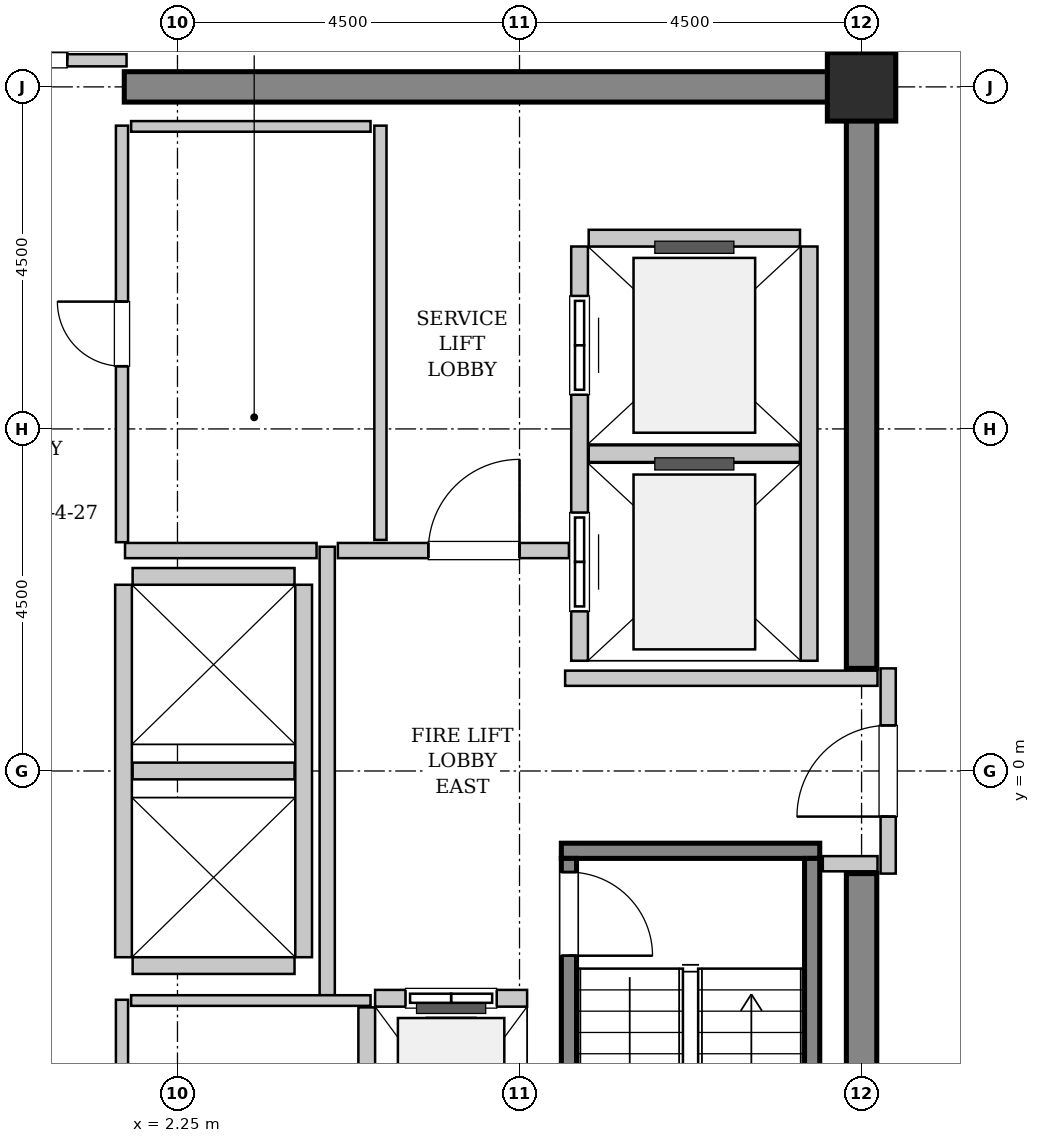
"""IFC4 building model, lengths in metres.
Left out: names, types, materials, properties, quantities, classifications, styles, units other than length and angle.
Written with IfcOpenShell. Run it as: python <this file> out.ifc"""

import sys

from ifc_helpers import new_model, si_unit, direction, frame, frame_2d, origin, origin_2d, place, context, subcontext, project, spatial, rectangle, extrude, source, transform, mapped, element, fill, save


model = new_model("IFC4")
c1 = context("Model", 3, precision=1e-05, world=origin(), true_north=direction((0.0, 1.0)))
c2 = subcontext(c1, "Body", "Model", "MODEL_VIEW")
j1 = project(units=[si_unit("LENGTHUNIT", "METRE"), si_unit("PLANEANGLEUNIT", "RADIAN")], contexts=[c1])
p1 = place(None, origin())
s1 = spatial("IfcSite", under=j1, at=p1, CompositionType="ELEMENT")
p2 = place(p1, origin())
s2 = spatial("IfcBuilding", under=s1, at=p2, CompositionType="ELEMENT")
p3 = place(p2, frame((0.0, 0.0, 322.4)))
s3 = spatial("IfcBuildingStorey", under=s2, at=p3, CompositionType="ELEMENT", Elevation=322.4)
m1 = source(origin(), c2, "Body", "SweptSolid", [
    extrude(rectangle(XDim=9.9, YDim=0.4, at=frame_2d((4.95, 0.0))), origin(), (0.0, 0.0, 1.0), 3.8),
])
p4 = place(p3, frame((1.55, 9.0, 0.0), z_axis=(0.0, 0.0, 1.0), x_axis=(1.0, 0.0, 0.0)))
e1 = element("IfcWall", 1, at=p4, inside=s3, PredefinedType="SHEAR", context=c2, shape_type="MappedRepresentation", body=[
    mapped(m1, transform((0.0, 0.0, 0.0), x_axis=(1.0, 0.0, 0.0), y_axis=(0.0, 1.0, 0.0), z_axis=(0.0, 0.0, 1.0), scale=1.0)),
])
m2 = source(origin(), c2, "Body", "SweptSolid", [
    extrude(rectangle(XDim=7.45, YDim=0.4, at=frame_2d((3.725, 0.0))), origin(), (0.0, 0.0, 1.0), 3.8),
])
for number, where, z_axis, x_axis in (
    (2, (11.25, -8.8, 0.0), (0.0, 0.0, 1.0), (0.0, 1.0, 0.0)),
    (3, (11.25, 1.35, 0.0), (0.0, 0.0, 1.0), (0.0, 1.0, 0.0)),
):
    element("IfcWall", number, at=place(p3, frame(where, z_axis=z_axis, x_axis=x_axis)), inside=s3, PredefinedType="SHEAR", context=c2, shape_type="MappedRepresentation", body=[
        mapped(m2, transform((0.0, 0.0, 0.0), x_axis=(1.0, 0.0, 0.0), y_axis=(0.0, 1.0, 0.0), z_axis=(0.0, 0.0, 1.0), scale=1.0)),
    ])
m3 = source(origin(), c2, "Body", "SweptSolid", [
    extrude(rectangle(XDim=0.9, YDim=0.9, at=origin_2d()), origin(), (0.0, 0.0, 1.0), 3.8),
])
p5 = place(p3, frame((11.25, 9.0, 0.0), z_axis=(0.0, 0.0, 1.0), x_axis=(1.0, 0.0, 0.0)))
e4 = element("IfcColumn", 4, at=p5, inside=s3, PredefinedType="COLUMN", context=c2, shape_type="MappedRepresentation", body=[
    mapped(m3, transform((0.0, 0.0, 0.0), x_axis=(1.0, 0.0, 0.0), y_axis=(0.0, 1.0, 0.0), z_axis=(0.0, 0.0, 1.0), scale=1.0)),
])
m4 = source(origin(), c2, "Body", "SweptSolid", [
    extrude(rectangle(XDim=3.4, YDim=0.2, at=frame_2d((1.7, 0.0))), origin(), (0.0, 0.0, 1.0), 3.8),
])
p6 = place(p3, frame((7.3, -1.05, 0.0), z_axis=(0.0, 0.0, 1.0), x_axis=(1.0, 0.0, 0.0)))
e5 = element("IfcWall", 5, at=p6, inside=s3, PredefinedType="SOLIDWALL", context=c2, shape_type="MappedRepresentation", body=[
    mapped(m4, transform((0.0, 0.0, 0.0), x_axis=(1.0, 0.0, 0.0), y_axis=(0.0, 1.0, 0.0), z_axis=(0.0, 0.0, 1.0), scale=1.0)),
])
m5 = source(origin(), c2, "Body", "SweptSolid", [
    extrude(rectangle(XDim=7.1, YDim=0.2, at=frame_2d((3.55, 0.0))), origin(), (0.0, 0.0, 1.0), 3.8),
])
p7 = place(p3, frame((7.4, -1.15, 0.0), z_axis=(0.0, 0.0, 1.0), x_axis=(0.0, -1.0, 0.0)))
e6 = element("IfcWall", 6, at=p7, inside=s3, PredefinedType="SOLIDWALL", context=c2, shape_type="MappedRepresentation", body=[
    mapped(m5, transform((0.0, 0.0, 0.0), x_axis=(1.0, 0.0, 0.0), y_axis=(0.0, 1.0, 0.0), z_axis=(0.0, 0.0, 1.0), scale=1.0)),
])
p8 = place(p7, frame((0.18, 0.0, 0.0)))
e7 = element("IfcOpeningElement", 7, at=p8, cuts=e6, PredefinedType="OPENING", context=c2, shape_type="SweptSolid", body=[
    extrude(rectangle(XDim=1.1, YDim=2.15, at=frame_2d((0.55, 1.075))), frame((0.0, 0.11, 0.0), z_axis=(0.0, -1.0, 0.0), x_axis=(1.0, 0.0, 0.0)), (0.0, 0.0, 1.0), 0.22),
])
p9 = place(p3, frame((10.6, -1.15, 0.0), z_axis=(0.0, 0.0, 1.0), x_axis=(0.0, -1.0, 0.0)))
e8 = element("IfcWall", 8, at=p9, inside=s3, PredefinedType="SOLIDWALL", context=c2, shape_type="MappedRepresentation", body=[
    mapped(m5, transform((0.0, 0.0, 0.0), x_axis=(1.0, 0.0, 0.0), y_axis=(0.0, 1.0, 0.0), z_axis=(0.0, 0.0, 1.0), scale=1.0)),
])
m6 = source(origin(), c2, "Body", "SweptSolid", [
    extrude(rectangle(XDim=2.0, YDim=0.22, at=frame_2d((1.0, 0.0))), origin(), (0.0, 0.0, 1.0), 3.535),
])
p10 = place(p3, frame((6.85, -2.99, 0.0), z_axis=(0.0, 0.0, 1.0), x_axis=(-1.0, 0.0, 0.0)))
e9 = element("IfcWall", 9, at=p10, inside=s3, PredefinedType="SOLIDWALL", context=c2, shape_type="MappedRepresentation", body=[
    mapped(m6, transform((0.0, 0.0, 0.0), x_axis=(1.0, 0.0, 0.0), y_axis=(0.0, 1.0, 0.0), z_axis=(0.0, 0.0, 1.0), scale=1.0)),
])
p11 = place(p10, frame((0.4, 0.0, 0.0)))
e10 = element("IfcOpeningElement", 10, at=p11, cuts=e9, PredefinedType="OPENING", context=c2, shape_type="SweptSolid", body=[
    extrude(rectangle(XDim=1.2, YDim=2.2, at=frame_2d((0.6, 1.1))), frame((0.0, 0.12, 0.0), z_axis=(0.0, -1.0, 0.0), x_axis=(1.0, 0.0, 0.0)), (0.0, 0.0, 1.0), 0.24),
])
m7 = source(origin(), c2, "Body", "SweptSolid", [
    extrude(rectangle(XDim=2.68, YDim=0.22, at=frame_2d((1.34, 0.0))), origin(), (0.0, 0.0, 1.0), 3.535),
])
p12 = place(p3, frame((4.74, -3.11, 0.0), z_axis=(0.0, 0.0, 1.0), x_axis=(0.0, -1.0, 0.0)))
e11 = element("IfcWall", 11, at=p12, inside=s3, PredefinedType="SOLIDWALL", context=c2, shape_type="MappedRepresentation", body=[
    mapped(m7, transform((0.0, 0.0, 0.0), x_axis=(1.0, 0.0, 0.0), y_axis=(0.0, 1.0, 0.0), z_axis=(0.0, 0.0, 1.0), scale=1.0)),
])
m8 = source(origin(), c2, "Body", "SweptSolid", [
    extrude(rectangle(XDim=5.45, YDim=0.22, at=frame_2d((2.725, 0.0))), origin(), (0.0, 0.0, 1.0), 3.535),
])
p13 = place(p3, frame((7.54, 6.9, 0.0), z_axis=(0.0, 0.0, 1.0), x_axis=(0.0, -1.0, 0.0)))
e12 = element("IfcWall", 12, at=p13, inside=s3, PredefinedType="SOLIDWALL", context=c2, shape_type="MappedRepresentation", body=[
    mapped(m8, transform((0.0, 0.0, 0.0), x_axis=(1.0, 0.0, 0.0), y_axis=(0.0, 1.0, 0.0), z_axis=(0.0, 0.0, 1.0), scale=1.0)),
])
p14 = place(p13, frame((3.5, 0.0, 0.0)))
e13 = element("IfcOpeningElement", 13, at=p14, cuts=e12, PredefinedType="OPENING", context=c2, shape_type="SweptSolid", body=[
    extrude(rectangle(XDim=1.3, YDim=2.3, at=frame_2d((0.65, 1.15))), frame((0.0, 0.12, 0.0), z_axis=(0.0, -1.0, 0.0), x_axis=(1.0, 0.0, 0.0)), (0.0, 0.0, 1.0), 0.24),
])
p15 = place(p13, frame((0.65, 0.0, 0.0)))
e14 = element("IfcOpeningElement", 14, at=p15, cuts=e12, PredefinedType="OPENING", context=c2, shape_type="SweptSolid", body=[
    extrude(rectangle(XDim=1.3, YDim=2.3, at=frame_2d((0.65, 1.15))), frame((0.0, 0.12, 0.0), z_axis=(0.0, -1.0, 0.0), x_axis=(1.0, 0.0, 0.0)), (0.0, 0.0, 1.0), 0.24),
])
p16 = place(p3, frame((10.56, 1.45, 0.0), z_axis=(0.0, 0.0, 1.0), x_axis=(0.0, 1.0, 0.0)))
e15 = element("IfcWall", 15, at=p16, inside=s3, PredefinedType="SOLIDWALL", context=c2, shape_type="MappedRepresentation", body=[
    mapped(m8, transform((0.0, 0.0, 0.0), x_axis=(1.0, 0.0, 0.0), y_axis=(0.0, 1.0, 0.0), z_axis=(0.0, 0.0, 1.0), scale=1.0)),
])
m9 = source(origin(), c2, "Body", "SweptSolid", [
    extrude(rectangle(XDim=2.78, YDim=0.22, at=frame_2d((1.39, 0.0))), origin(), (0.0, 0.0, 1.0), 3.535),
])
for number, where, z_axis, x_axis in (
    (16, (7.66, 4.175, 0.0), (0.0, 0.0, 1.0), (1.0, 0.0, 0.0)),
    (17, (10.44, 7.01, 0.0), (0.0, 0.0, 1.0), (-1.0, 0.0, 0.0)),
):
    element("IfcWall", number, at=place(p3, frame(where, z_axis=z_axis, x_axis=x_axis)), inside=s3, PredefinedType="SOLIDWALL", context=c2, shape_type="MappedRepresentation", body=[
        mapped(m9, transform((0.0, 0.0, 0.0), x_axis=(1.0, 0.0, 0.0), y_axis=(0.0, 1.0, 0.0), z_axis=(0.0, 0.0, 1.0), scale=1.0)),
    ])
m10 = source(origin(), c2, "Body", "SweptSolid", [
    extrude(rectangle(XDim=4.9, YDim=0.22, at=frame_2d((2.45, 0.0))), origin(), (0.0, 0.0, 1.0), 3.535),
])
for number, where, z_axis, x_axis in (
    (18, (1.54, 2.45, 0.0), (0.0, 0.0, 1.0), (0.0, -1.0, 0.0)),
    (19, (3.91, -2.45, 0.0), (0.0, 0.0, 1.0), (0.0, 1.0, 0.0)),
):
    element("IfcWall", number, at=place(p3, frame(where, z_axis=z_axis, x_axis=x_axis)), inside=s3, PredefinedType="SOLIDWALL", context=c2, shape_type="MappedRepresentation", body=[
        mapped(m10, transform((0.0, 0.0, 0.0), x_axis=(1.0, 0.0, 0.0), y_axis=(0.0, 1.0, 0.0), z_axis=(0.0, 0.0, 1.0), scale=1.0)),
    ])
m11 = source(origin(), c2, "Body", "SweptSolid", [
    extrude(rectangle(XDim=2.13, YDim=0.22, at=frame_2d((1.065, 0.0))), origin(), (0.0, 0.0, 1.0), 3.535),
])
for number, where, z_axis, x_axis in (
    (20, (1.66, -2.56, 0.0), (0.0, 0.0, 1.0), (1.0, 0.0, 0.0)),
    (21, (1.66, 0.0, 0.0), (0.0, 0.0, 1.0), (1.0, 0.0, 0.0)),
    (22, (3.79, 2.56, 0.0), (0.0, 0.0, 1.0), (-1.0, 0.0, 0.0)),
):
    element("IfcWall", number, at=place(p3, frame(where, z_axis=z_axis, x_axis=x_axis)), inside=s3, PredefinedType="SOLIDWALL", context=c2, shape_type="MappedRepresentation", body=[
        mapped(m11, transform((0.0, 0.0, 0.0), x_axis=(1.0, 0.0, 0.0), y_axis=(0.0, 1.0, 0.0), z_axis=(0.0, 0.0, 1.0), scale=1.0)),
    ])
m12 = source(origin(), c2, "Body", "SweptSolid", [
    extrude(rectangle(XDim=2.7, YDim=0.2, at=frame_2d((1.35, 0.0))), origin(), (0.0, 0.0, 1.0), 2.625),
])
p17 = place(p3, frame((11.6, -1.35, 0.0), z_axis=(0.0, 0.0, 1.0), x_axis=(0.0, 1.0, 0.0)))
e23 = element("IfcWall", 23, at=p17, inside=s3, PredefinedType="PARTITIONING", context=c2, shape_type="MappedRepresentation", body=[
    mapped(m12, transform((0.0, 0.0, 0.0), x_axis=(1.0, 0.0, 0.0), y_axis=(0.0, 1.0, 0.0), z_axis=(0.0, 0.0, 1.0), scale=1.0)),
])
p18 = place(p17, frame((0.75, 0.0, 0.0)))
e24 = element("IfcOpeningElement", 24, at=p18, cuts=e23, PredefinedType="OPENING", context=c2, shape_type="SweptSolid", body=[
    extrude(rectangle(XDim=1.2, YDim=2.15, at=frame_2d((0.6, 1.075))), frame((0.0, 0.11, 0.0), z_axis=(0.0, -1.0, 0.0), x_axis=(1.0, 0.0, 0.0)), (0.0, 0.0, 1.0), 0.22),
])
m13 = source(origin(), c2, "Body", "SweptSolid", [
    extrude(rectangle(XDim=5.9, YDim=0.2, at=frame_2d((2.95, 0.0))), origin(), (0.0, 0.0, 1.0), 3.535),
])
p19 = place(p3, frame((4.22, -2.95, 0.0), z_axis=(0.0, 0.0, 1.0), x_axis=(0.0, 1.0, 0.0)))
e25 = element("IfcWall", 25, at=p19, inside=s3, PredefinedType="PARTITIONING", context=c2, shape_type="MappedRepresentation", body=[
    mapped(m13, transform((0.0, 0.0, 0.0), x_axis=(1.0, 0.0, 0.0), y_axis=(0.0, 1.0, 0.0), z_axis=(0.0, 0.0, 1.0), scale=1.0)),
])
m14 = source(origin(), c2, "Body", "SweptSolid", [
    extrude(rectangle(XDim=2.52, YDim=0.2, at=frame_2d((1.26, 0.0))), origin(), (0.0, 0.0, 1.0), 3.535),
])
p20 = place(p3, frame((1.56, 2.9, 0.0), z_axis=(0.0, 0.0, 1.0), x_axis=(1.0, 0.0, 0.0)))
e26 = element("IfcWall", 26, at=p20, inside=s3, PredefinedType="PARTITIONING", context=c2, shape_type="MappedRepresentation", body=[
    mapped(m14, transform((0.0, 0.0, 0.0), x_axis=(1.0, 0.0, 0.0), y_axis=(0.0, 1.0, 0.0), z_axis=(0.0, 0.0, 1.0), scale=1.0)),
])
m15 = source(origin(), c2, "Body", "SweptSolid", [
    extrude(rectangle(XDim=3.04, YDim=0.2, at=frame_2d((1.52, 0.0))), origin(), (0.0, 0.0, 1.0), 3.535),
])
p21 = place(p3, frame((4.36, 2.9, 0.0), z_axis=(0.0, 0.0, 1.0), x_axis=(1.0, 0.0, 0.0)))
e27 = element("IfcWall", 27, at=p21, inside=s3, PredefinedType="PARTITIONING", context=c2, shape_type="MappedRepresentation", body=[
    mapped(m15, transform((0.0, 0.0, 0.0), x_axis=(1.0, 0.0, 0.0), y_axis=(0.0, 1.0, 0.0), z_axis=(0.0, 0.0, 1.0), scale=1.0)),
])
p22 = place(p21, frame((1.19, 0.0, 0.0)))
e28 = element("IfcOpeningElement", 28, at=p22, cuts=e27, PredefinedType="OPENING", context=c2, shape_type="SweptSolid", body=[
    extrude(rectangle(XDim=1.2, YDim=2.15, at=frame_2d((0.6, 1.075))), frame((0.0, 0.11, 0.0), z_axis=(0.0, -1.0, 0.0), x_axis=(1.0, 0.0, 0.0)), (0.0, 0.0, 1.0), 0.22),
])
m16 = source(origin(), c2, "Body", "SweptSolid", [
    extrude(rectangle(XDim=4.11, YDim=0.2, at=frame_2d((2.055, 0.0))), origin(), (0.0, 0.0, 1.0), 3.535),
])
p23 = place(p3, frame((7.35, 1.22, 0.0), z_axis=(0.0, 0.0, 1.0), x_axis=(1.0, 0.0, 0.0)))
e29 = element("IfcWall", 29, at=p23, inside=s3, PredefinedType="PARTITIONING", context=c2, shape_type="MappedRepresentation", body=[
    mapped(m16, transform((0.0, 0.0, 0.0), x_axis=(1.0, 0.0, 0.0), y_axis=(0.0, 1.0, 0.0), z_axis=(0.0, 0.0, 1.0), scale=1.0)),
])
m17 = source(origin(), c2, "Body", "SweptSolid", [
    extrude(rectangle(XDim=0.72, YDim=0.2, at=frame_2d((0.36, 0.0))), origin(), (0.0, 0.0, 1.0), 3.535),
])
p24 = place(p3, frame((10.74, -1.22, 0.0), z_axis=(0.0, 0.0, 1.0), x_axis=(1.0, 0.0, 0.0)))
e30 = element("IfcWall", 30, at=p24, inside=s3, PredefinedType="PARTITIONING", context=c2, shape_type="MappedRepresentation", body=[
    mapped(m17, transform((0.0, 0.0, 0.0), x_axis=(1.0, 0.0, 0.0), y_axis=(0.0, 1.0, 0.0), z_axis=(0.0, 0.0, 1.0), scale=1.0)),
])
m18 = source(origin(), c2, "Body", "SweptSolid", [
    extrude(rectangle(XDim=3.16, YDim=0.16, at=frame_2d((1.58, 0.0))), origin(), (0.0, 0.0, 1.0), 2.625),
])
p25 = place(p3, frame((-1.58, 9.35, 0.0), z_axis=(0.0, 0.0, 1.0), x_axis=(1.0, 0.0, 0.0)))
e31 = element("IfcWall", 31, at=p25, inside=s3, PredefinedType="PARTITIONING", context=c2, shape_type="MappedRepresentation", body=[
    mapped(m18, transform((0.0, 0.0, 0.0), x_axis=(1.0, 0.0, 0.0), y_axis=(0.0, 1.0, 0.0), z_axis=(0.0, 0.0, 1.0), scale=1.0)),
])
p26 = place(p25, frame((0.78, 0.0, 0.0)))
e32 = element("IfcOpeningElement", 32, at=p26, cuts=e31, PredefinedType="OPENING", context=c2, shape_type="SweptSolid", body=[
    extrude(rectangle(XDim=1.6, YDim=2.3, at=frame_2d((0.8, 1.15))), frame((0.0, 0.09, 0.0), z_axis=(0.0, -1.0, 0.0), x_axis=(1.0, 0.0, 0.0)), (0.0, 0.0, 1.0), 0.18),
])
m19 = source(origin(), c2, "Body", "SweptSolid", [
    extrude(rectangle(XDim=5.45, YDim=0.16, at=frame_2d((2.725, 0.0))), origin(), (0.0, 0.0, 1.0), 3.535),
])
p27 = place(p3, frame((4.92, 3.04, 0.0), z_axis=(0.0, 0.0, 1.0), x_axis=(0.0, 1.0, 0.0)))
e33 = element("IfcWall", 33, at=p27, inside=s3, PredefinedType="PARTITIONING", context=c2, shape_type="MappedRepresentation", body=[
    mapped(m19, transform((0.0, 0.0, 0.0), x_axis=(1.0, 0.0, 0.0), y_axis=(0.0, 1.0, 0.0), z_axis=(0.0, 0.0, 1.0), scale=1.0)),
])
m20 = source(origin(), c2, "Body", "SweptSolid", [
    extrude(rectangle(XDim=5.48, YDim=0.16, at=frame_2d((2.74, 0.0))), origin(), (0.0, 0.0, 1.0), 3.535),
])
p28 = place(p3, frame((1.52, 3.01, 0.0), z_axis=(0.0, 0.0, 1.0), x_axis=(0.0, 1.0, 0.0)))
e34 = element("IfcWall", 34, at=p28, inside=s3, PredefinedType="PARTITIONING", context=c2, shape_type="MappedRepresentation", body=[
    mapped(m20, transform((0.0, 0.0, 0.0), x_axis=(1.0, 0.0, 0.0), y_axis=(0.0, 1.0, 0.0), z_axis=(0.0, 0.0, 1.0), scale=1.0)),
])
p29 = place(p28, frame((2.315, 0.0, 0.0)))
e35 = element("IfcOpeningElement", 35, at=p29, cuts=e34, PredefinedType="OPENING", context=c2, shape_type="SweptSolid", body=[
    extrude(rectangle(XDim=0.85, YDim=2.1, at=frame_2d((0.425, 1.05))), frame((0.0, 0.09, 0.0), z_axis=(0.0, -1.0, 0.0), x_axis=(1.0, 0.0, 0.0)), (0.0, 0.0, 1.0), 0.18),
])
m21 = source(origin(), c2, "Body", "SweptSolid", [
    extrude(rectangle(XDim=3.15, YDim=0.14, at=frame_2d((1.575, 0.0))), origin(), (0.0, 0.0, 1.0), 3.535),
])
p30 = place(p3, frame((1.64, 8.48, 0.0), z_axis=(0.0, 0.0, 1.0), x_axis=(1.0, 0.0, 0.0)))
e36 = element("IfcWall", 36, at=p30, inside=s3, PredefinedType="PARTITIONING", context=c2, shape_type="MappedRepresentation", body=[
    mapped(m21, transform((0.0, 0.0, 0.0), x_axis=(1.0, 0.0, 0.0), y_axis=(0.0, 1.0, 0.0), z_axis=(0.0, 0.0, 1.0), scale=1.0)),
])
p31 = place(p3, frame((1.52, -8.49, 0.0), z_axis=(0.0, 0.0, 1.0), x_axis=(0.0, 1.0, 0.0)))
e37 = element("IfcWall", 37, at=p31, inside=s3, PredefinedType="PARTITIONING", context=c2, shape_type="MappedRepresentation", body=[
    mapped(m20, transform((0.0, 0.0, 0.0), x_axis=(1.0, 0.0, 0.0), y_axis=(0.0, 1.0, 0.0), z_axis=(0.0, 0.0, 1.0), scale=1.0)),
])
p32 = place(p31, frame((2.315, 0.0, 0.0)))
e38 = element("IfcOpeningElement", 38, at=p32, cuts=e37, PredefinedType="OPENING", context=c2, shape_type="SweptSolid", body=[
    extrude(rectangle(XDim=0.85, YDim=2.1, at=frame_2d((0.425, 1.05))), frame((0.0, 0.09, 0.0), z_axis=(0.0, -1.0, 0.0), x_axis=(1.0, 0.0, 0.0)), (0.0, 0.0, 1.0), 0.18),
])
p33 = place(p3, frame((1.64, -3.02, 0.0), z_axis=(0.0, 0.0, 1.0), x_axis=(1.0, 0.0, 0.0)))
e39 = element("IfcWall", 39, at=p33, inside=s3, PredefinedType="PARTITIONING", context=c2, shape_type="MappedRepresentation", body=[
    mapped(m21, transform((0.0, 0.0, 0.0), x_axis=(1.0, 0.0, 0.0), y_axis=(0.0, 1.0, 0.0), z_axis=(0.0, 0.0, 1.0), scale=1.0)),
])
m22 = source(origin(), c2, "Body", "SweptSolid", [
    extrude(rectangle(XDim=1.1, YDim=2.15, at=frame_2d((0.55, 1.075))), frame((0.0, 0.025, 0.0), z_axis=(0.0, -1.0, 0.0), x_axis=(1.0, 0.0, 0.0)), (0.0, 0.0, 1.0), 0.05),
])
p34 = place(p8, origin())
e40 = element("IfcDoor", 40, at=p34, inside=s3, OperationType="SINGLE_SWING_RIGHT", PredefinedType="DOOR", context=c2, shape_type="MappedRepresentation", body=[
    mapped(m22, transform((0.0, 0.0, 0.0), x_axis=(1.0, 0.0, 0.0), y_axis=(0.0, 1.0, 0.0), z_axis=(0.0, 0.0, 1.0), scale=1.0)),
])
fill(e7, e40)
m23 = source(origin(), c2, "Body", "SweptSolid", [
    extrude(rectangle(XDim=1.2, YDim=2.2, at=frame_2d((0.6, 1.1))), frame((0.0, 0.025, 0.0), z_axis=(0.0, -1.0, 0.0), x_axis=(1.0, 0.0, 0.0)), (0.0, 0.0, 1.0), 0.05),
])
p35 = place(p11, origin())
e41 = element("IfcDoor", 41, at=p35, inside=s3, OperationType="SLIDING_TO_LEFT", PredefinedType="DOOR", context=c2, shape_type="MappedRepresentation", body=[
    mapped(m23, transform((0.0, 0.0, 0.0), x_axis=(1.0, 0.0, 0.0), y_axis=(0.0, 1.0, 0.0), z_axis=(0.0, 0.0, 1.0), scale=1.0)),
])
fill(e10, e41)
m24 = source(origin(), c2, "Body", "SweptSolid", [
    extrude(rectangle(XDim=1.3, YDim=2.3, at=frame_2d((0.65, 1.15))), frame((0.0, 0.025, 0.0), z_axis=(0.0, -1.0, 0.0), x_axis=(1.0, 0.0, 0.0)), (0.0, 0.0, 1.0), 0.05),
])
p36 = place(p14, origin())
e42 = element("IfcDoor", 42, at=p36, inside=s3, OperationType="SLIDING_TO_RIGHT", PredefinedType="DOOR", context=c2, shape_type="MappedRepresentation", body=[
    mapped(m24, transform((0.0, 0.0, 0.0), x_axis=(1.0, 0.0, 0.0), y_axis=(0.0, 1.0, 0.0), z_axis=(0.0, 0.0, 1.0), scale=1.0)),
])
fill(e13, e42)
p37 = place(p15, origin())
e43 = element("IfcDoor", 43, at=p37, inside=s3, OperationType="SLIDING_TO_RIGHT", PredefinedType="DOOR", context=c2, shape_type="MappedRepresentation", body=[
    mapped(m24, transform((0.0, 0.0, 0.0), x_axis=(1.0, 0.0, 0.0), y_axis=(0.0, 1.0, 0.0), z_axis=(0.0, 0.0, 1.0), scale=1.0)),
])
fill(e14, e43)
m25 = source(origin(), c2, "Body", "SweptSolid", [
    extrude(rectangle(XDim=1.2, YDim=2.15, at=frame_2d((0.6, 1.075))), frame((0.0, 0.025, 0.0), z_axis=(0.0, -1.0, 0.0), x_axis=(1.0, 0.0, 0.0)), (0.0, 0.0, 1.0), 0.05),
])
p38 = place(p18, origin())
e44 = element("IfcDoor", 44, at=p38, inside=s3, OperationType="SINGLE_SWING_LEFT", PredefinedType="DOOR", context=c2, shape_type="MappedRepresentation", body=[
    mapped(m25, transform((0.0, 0.0, 0.0), x_axis=(1.0, 0.0, 0.0), y_axis=(0.0, 1.0, 0.0), z_axis=(0.0, 0.0, 1.0), scale=1.0)),
])
fill(e24, e44)
p39 = place(p22, origin())
e45 = element("IfcDoor", 45, at=p39, inside=s3, OperationType="SINGLE_SWING_RIGHT", PredefinedType="DOOR", context=c2, shape_type="MappedRepresentation", body=[
    mapped(m25, transform((0.0, 0.0, 0.0), x_axis=(1.0, 0.0, 0.0), y_axis=(0.0, 1.0, 0.0), z_axis=(0.0, 0.0, 1.0), scale=1.0)),
])
fill(e28, e45)
m26 = source(origin(), c2, "Body", "SweptSolid", [
    extrude(rectangle(XDim=1.6, YDim=2.3, at=frame_2d((0.8, 1.15))), frame((0.0, 0.025, 0.0), z_axis=(0.0, -1.0, 0.0), x_axis=(1.0, 0.0, 0.0)), (0.0, 0.0, 1.0), 0.05),
])
p40 = place(p26, origin())
e46 = element("IfcDoor", 46, at=p40, inside=s3, OperationType="DOUBLE_DOOR_SINGLE_SWING", PredefinedType="DOOR", context=c2, shape_type="MappedRepresentation", body=[
    mapped(m26, transform((0.0, 0.0, 0.0), x_axis=(1.0, 0.0, 0.0), y_axis=(0.0, 1.0, 0.0), z_axis=(0.0, 0.0, 1.0), scale=1.0)),
])
fill(e32, e46)
m27 = source(origin(), c2, "Body", "SweptSolid", [
    extrude(rectangle(XDim=0.85, YDim=2.1, at=frame_2d((0.425, 1.05))), frame((0.0, 0.025, 0.0), z_axis=(0.0, -1.0, 0.0), x_axis=(1.0, 0.0, 0.0)), (0.0, 0.0, 1.0), 0.05),
])
p41 = place(p29, origin())
e47 = element("IfcDoor", 47, at=p41, inside=s3, OperationType="SINGLE_SWING_RIGHT", PredefinedType="DOOR", context=c2, shape_type="MappedRepresentation", body=[
    mapped(m27, transform((0.0, 0.0, 0.0), x_axis=(1.0, 0.0, 0.0), y_axis=(0.0, 1.0, 0.0), z_axis=(0.0, 0.0, 1.0), scale=1.0)),
])
fill(e35, e47)
save(model, sys.argv[1])
